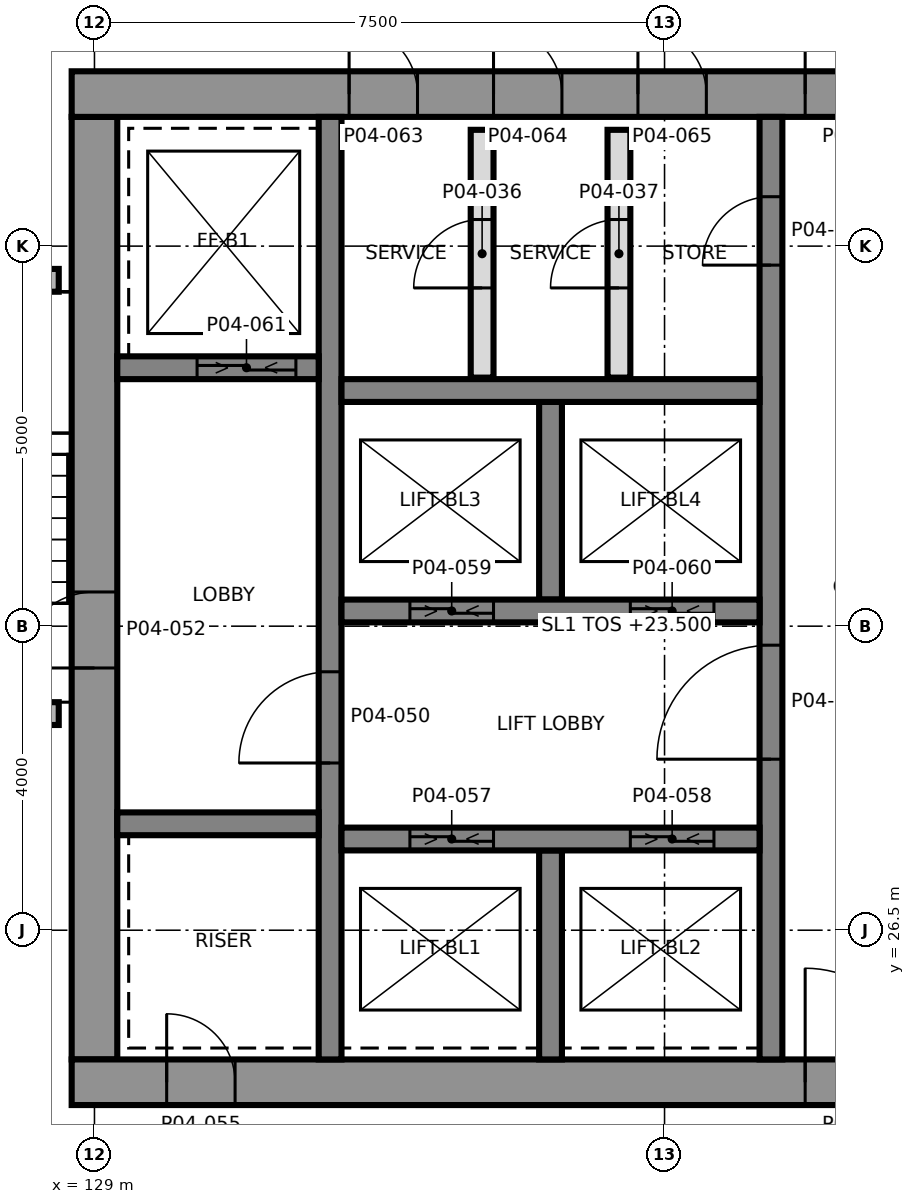
"""IFC4 building model, lengths in metres.
Left out: names, types, materials, properties, quantities, classifications, styles, units other than length and angle.
Written with IfcOpenShell. Run it as: python <this file> out.ifc"""

import sys

from ifc_helpers import new_model, si_unit, direction, frame, frame_2d, origin, place, context, subcontext, project, spatial, rectangle, extrude, element, fill, save


model = new_model("IFC4")
c1 = context("Model", 3, precision=1e-05, world=origin(), true_north=direction((0.0, 1.0)))
c2 = subcontext(c1, "Body", "Model", "MODEL_VIEW")
j1 = project(units=[si_unit("LENGTHUNIT", "METRE"), si_unit("PLANEANGLEUNIT", "RADIAN")], contexts=[c1])
p1 = place(None, origin())
s1 = spatial("IfcSite", under=j1, at=p1, CompositionType="ELEMENT")
p2 = place(p1, origin())
s2 = spatial("IfcBuilding", under=s1, at=p2, CompositionType="ELEMENT")
p3 = place(p2, frame((0.0, 0.0, 23.5)))
s3 = spatial("IfcBuildingStorey", under=s2, at=p3, CompositionType="ELEMENT", Elevation=23.5)
p4 = place(p3, frame((129.0, 24.8, 0.0), z_axis=(0.0, 0.0, 1.0), x_axis=(0.0, 1.0, 0.0)))
e1 = element("IfcWall", 1, at=p4, inside=s3, PredefinedType="SHEAR", context=c2, shape_type="SweptSolid", body=[
    extrude(rectangle(XDim=12.4, YDim=0.6, at=frame_2d((6.2, 0.0))), origin(), (0.0, 0.0, 1.0), 5.0),
])
p5 = place(p4, frame((5.15, 0.0, 0.0)))
e2 = element("IfcOpeningElement", 2, at=p5, cuts=e1, PredefinedType="OPENING", context=c2, shape_type="SweptSolid", body=[
    extrude(rectangle(XDim=1.0, YDim=2.1, at=frame_2d((0.5, 1.05))), frame((0.0, 0.31, 0.0), z_axis=(0.0, -1.0, 0.0), x_axis=(1.0, 0.0, 0.0)), (0.0, 0.0, 1.0), 0.62),
])
p6 = place(p3, frame((128.7, 24.5, 0.0), z_axis=(0.0, 0.0, 1.0), x_axis=(1.0, 0.0, 0.0)))
e3 = element("IfcWall", 3, at=p6, inside=s3, PredefinedType="SHEAR", context=c2, shape_type="SweptSolid", body=[
    extrude(rectangle(XDim=15.0, YDim=0.6, at=frame_2d((7.5, 0.0))), origin(), (0.0, 0.0, 1.0), 5.0),
])
p7 = place(p6, frame((9.65, 0.0, 0.0)))
e4 = element("IfcOpeningElement", 4, at=p7, cuts=e3, PredefinedType="OPENING", context=c2, shape_type="SweptSolid", body=[
    extrude(rectangle(XDim=1.5, YDim=2.1, at=frame_2d((0.75, 1.05))), frame((0.0, 0.31, 0.0), z_axis=(0.0, -1.0, 0.0), x_axis=(1.0, 0.0, 0.0)), (0.0, 0.0, 1.0), 0.62),
])
p8 = place(p6, frame((1.25, 0.0, 0.0)))
e5 = element("IfcOpeningElement", 5, at=p8, cuts=e3, PredefinedType="OPENING", context=c2, shape_type="SweptSolid", body=[
    extrude(rectangle(XDim=0.9, YDim=2.1, at=frame_2d((0.45, 1.05))), frame((0.0, 0.31, 0.0), z_axis=(0.0, -1.0, 0.0), x_axis=(1.0, 0.0, 0.0)), (0.0, 0.0, 1.0), 0.62),
])
p9 = place(p3, frame((128.7, 37.5, 0.0), z_axis=(0.0, 0.0, 1.0), x_axis=(1.0, 0.0, 0.0)))
e6 = element("IfcWall", 6, at=p9, inside=s3, PredefinedType="SHEAR", context=c2, shape_type="SweptSolid", body=[
    extrude(rectangle(XDim=15.0, YDim=0.6, at=frame_2d((7.5, 0.0))), origin(), (0.0, 0.0, 1.0), 5.0),
])
p10 = place(p9, frame((9.65, 0.0, 0.0)))
e7 = element("IfcOpeningElement", 7, at=p10, cuts=e6, PredefinedType="OPENING", context=c2, shape_type="SweptSolid", body=[
    extrude(rectangle(XDim=1.5, YDim=2.1, at=frame_2d((0.75, 1.05))), frame((0.0, 0.31, 0.0), z_axis=(0.0, -1.0, 0.0), x_axis=(1.0, 0.0, 0.0)), (0.0, 0.0, 1.0), 0.62),
])
p11 = place(p9, frame((12.85, 0.0, 0.0)))
e8 = element("IfcOpeningElement", 8, at=p11, cuts=e6, PredefinedType="OPENING", context=c2, shape_type="SweptSolid", body=[
    extrude(rectangle(XDim=0.9, YDim=2.1, at=frame_2d((0.45, 1.05))), frame((0.0, 0.31, 0.0), z_axis=(0.0, -1.0, 0.0), x_axis=(1.0, 0.0, 0.0)), (0.0, 0.0, 1.0), 0.62),
])
p12 = place(p9, frame((3.65, 0.0, 0.0)))
e9 = element("IfcOpeningElement", 9, at=p12, cuts=e6, PredefinedType="OPENING", context=c2, shape_type="SweptSolid", body=[
    extrude(rectangle(XDim=0.9, YDim=2.1, at=frame_2d((0.45, 1.05))), frame((0.0, 0.31, 0.0), z_axis=(0.0, -1.0, 0.0), x_axis=(1.0, 0.0, 0.0)), (0.0, 0.0, 1.0), 0.62),
])
p13 = place(p9, frame((5.55, 0.0, 0.0)))
e10 = element("IfcOpeningElement", 10, at=p13, cuts=e6, PredefinedType="OPENING", context=c2, shape_type="SweptSolid", body=[
    extrude(rectangle(XDim=0.9, YDim=2.1, at=frame_2d((0.45, 1.05))), frame((0.0, 0.31, 0.0), z_axis=(0.0, -1.0, 0.0), x_axis=(1.0, 0.0, 0.0)), (0.0, 0.0, 1.0), 0.62),
])
p14 = place(p9, frame((7.45, 0.0, 0.0)))
e11 = element("IfcOpeningElement", 11, at=p14, cuts=e6, PredefinedType="OPENING", context=c2, shape_type="SweptSolid", body=[
    extrude(rectangle(XDim=0.9, YDim=2.1, at=frame_2d((0.45, 1.05))), frame((0.0, 0.31, 0.0), z_axis=(0.0, -1.0, 0.0), x_axis=(1.0, 0.0, 0.0)), (0.0, 0.0, 1.0), 0.62),
])
p15 = place(p3, frame((132.1, 24.8, 0.0), z_axis=(0.0, 0.0, 1.0), x_axis=(0.0, 1.0, 0.0)))
e12 = element("IfcWall", 12, at=p15, inside=s3, PredefinedType="SHEAR", context=c2, shape_type="SweptSolid", body=[
    extrude(rectangle(XDim=12.4, YDim=0.3, at=frame_2d((6.2, 0.0))), origin(), (0.0, 0.0, 1.0), 5.0),
])
p16 = place(p15, frame((3.9, 0.0, 0.0)))
e13 = element("IfcOpeningElement", 13, at=p16, cuts=e12, PredefinedType="OPENING", context=c2, shape_type="SweptSolid", body=[
    extrude(rectangle(XDim=1.2, YDim=2.1, at=frame_2d((0.6, 1.05))), frame((0.0, 0.16, 0.0), z_axis=(0.0, -1.0, 0.0), x_axis=(1.0, 0.0, 0.0)), (0.0, 0.0, 1.0), 0.32),
])
p17 = place(p3, frame((137.9, 24.8, 0.0), z_axis=(0.0, 0.0, 1.0), x_axis=(0.0, 1.0, 0.0)))
e14 = element("IfcWall", 14, at=p17, inside=s3, PredefinedType="SHEAR", context=c2, shape_type="SweptSolid", body=[
    extrude(rectangle(XDim=12.4, YDim=0.3, at=frame_2d((6.2, 0.0))), origin(), (0.0, 0.0, 1.0), 5.0),
])
p18 = place(p17, frame((3.95, 0.0, 0.0)))
e15 = element("IfcOpeningElement", 15, at=p18, cuts=e14, PredefinedType="OPENING", context=c2, shape_type="SweptSolid", body=[
    extrude(rectangle(XDim=1.5, YDim=2.1, at=frame_2d((0.75, 1.05))), frame((0.0, 0.16, 0.0), z_axis=(0.0, -1.0, 0.0), x_axis=(1.0, 0.0, 0.0)), (0.0, 0.0, 1.0), 0.32),
])
p19 = place(p17, frame((10.45, 0.0, 0.0)))
e16 = element("IfcOpeningElement", 16, at=p19, cuts=e14, PredefinedType="OPENING", context=c2, shape_type="SweptSolid", body=[
    extrude(rectangle(XDim=0.9, YDim=2.1, at=frame_2d((0.45, 1.05))), frame((0.0, 0.16, 0.0), z_axis=(0.0, -1.0, 0.0), x_axis=(1.0, 0.0, 0.0)), (0.0, 0.0, 1.0), 0.32),
])
p20 = place(p3, frame((135.0, 24.8, 0.0), z_axis=(0.0, 0.0, 1.0), x_axis=(0.0, 1.0, 0.0)))
e17 = element("IfcWall", 17, at=p20, inside=s3, PredefinedType="SHEAR", context=c2, shape_type="SweptSolid", body=[
    extrude(rectangle(XDim=2.75, YDim=0.3, at=frame_2d((1.375, 0.0))), origin(), (0.0, 0.0, 1.0), 5.0),
])
p21 = place(p3, frame((135.0, 30.85, 0.0), z_axis=(0.0, 0.0, 1.0), x_axis=(0.0, 1.0, 0.0)))
e18 = element("IfcWall", 18, at=p21, inside=s3, PredefinedType="SHEAR", context=c2, shape_type="SweptSolid", body=[
    extrude(rectangle(XDim=2.6, YDim=0.3, at=frame_2d((1.3, 0.0))), origin(), (0.0, 0.0, 1.0), 5.0),
])
p22 = place(p3, frame((132.25, 27.7, 0.0), z_axis=(0.0, 0.0, 1.0), x_axis=(1.0, 0.0, 0.0)))
e19 = element("IfcWall", 19, at=p22, inside=s3, PredefinedType="SHEAR", context=c2, shape_type="SweptSolid", body=[
    extrude(rectangle(XDim=5.5, YDim=0.3, at=frame_2d((2.75, 0.0))), origin(), (0.0, 0.0, 1.0), 5.0),
])
p23 = place(p22, frame((0.9, 0.0, 0.0)))
e20 = element("IfcOpeningElement", 20, at=p23, cuts=e19, PredefinedType="OPENING", context=c2, shape_type="SweptSolid", body=[
    extrude(rectangle(XDim=1.1, YDim=2.4, at=frame_2d((0.55, 1.2))), frame((0.0, 0.16, 0.0), z_axis=(0.0, -1.0, 0.0), x_axis=(1.0, 0.0, 0.0)), (0.0, 0.0, 1.0), 0.32),
])
p24 = place(p22, frame((3.8, 0.0, 0.0)))
e21 = element("IfcOpeningElement", 21, at=p24, cuts=e19, PredefinedType="OPENING", context=c2, shape_type="SweptSolid", body=[
    extrude(rectangle(XDim=1.1, YDim=2.4, at=frame_2d((0.55, 1.2))), frame((0.0, 0.16, 0.0), z_axis=(0.0, -1.0, 0.0), x_axis=(1.0, 0.0, 0.0)), (0.0, 0.0, 1.0), 0.32),
])
p25 = place(p3, frame((132.25, 30.7, 0.0), z_axis=(0.0, 0.0, 1.0), x_axis=(1.0, 0.0, 0.0)))
e22 = element("IfcWall", 22, at=p25, inside=s3, PredefinedType="SHEAR", context=c2, shape_type="SweptSolid", body=[
    extrude(rectangle(XDim=5.5, YDim=0.3, at=frame_2d((2.75, 0.0))), origin(), (0.0, 0.0, 1.0), 5.0),
])
p26 = place(p25, frame((0.9, 0.0, 0.0)))
e23 = element("IfcOpeningElement", 23, at=p26, cuts=e22, PredefinedType="OPENING", context=c2, shape_type="SweptSolid", body=[
    extrude(rectangle(XDim=1.1, YDim=2.4, at=frame_2d((0.55, 1.2))), frame((0.0, 0.16, 0.0), z_axis=(0.0, -1.0, 0.0), x_axis=(1.0, 0.0, 0.0)), (0.0, 0.0, 1.0), 0.32),
])
p27 = place(p25, frame((3.8, 0.0, 0.0)))
e24 = element("IfcOpeningElement", 24, at=p27, cuts=e22, PredefinedType="OPENING", context=c2, shape_type="SweptSolid", body=[
    extrude(rectangle(XDim=1.1, YDim=2.4, at=frame_2d((0.55, 1.2))), frame((0.0, 0.16, 0.0), z_axis=(0.0, -1.0, 0.0), x_axis=(1.0, 0.0, 0.0)), (0.0, 0.0, 1.0), 0.32),
])
p28 = place(p3, frame((132.25, 33.6, 0.0), z_axis=(0.0, 0.0, 1.0), x_axis=(1.0, 0.0, 0.0)))
e25 = element("IfcWall", 25, at=p28, inside=s3, PredefinedType="SHEAR", context=c2, shape_type="SweptSolid", body=[
    extrude(rectangle(XDim=5.5, YDim=0.3, at=frame_2d((2.75, 0.0))), origin(), (0.0, 0.0, 1.0), 5.0),
])
p29 = place(p3, frame((129.3, 27.9, 0.0), z_axis=(0.0, 0.0, 1.0), x_axis=(1.0, 0.0, 0.0)))
e26 = element("IfcWall", 26, at=p29, inside=s3, PredefinedType="SHEAR", context=c2, shape_type="SweptSolid", body=[
    extrude(rectangle(XDim=2.65, YDim=0.3, at=frame_2d((1.325, 0.0))), origin(), (0.0, 0.0, 1.0), 5.0),
])
p30 = place(p3, frame((129.3, 33.9, 0.0), z_axis=(0.0, 0.0, 1.0), x_axis=(1.0, 0.0, 0.0)))
e27 = element("IfcWall", 27, at=p30, inside=s3, PredefinedType="SHEAR", context=c2, shape_type="SweptSolid", body=[
    extrude(rectangle(XDim=2.65, YDim=0.3, at=frame_2d((1.325, 0.0))), origin(), (0.0, 0.0, 1.0), 5.0),
])
p31 = place(p30, frame((1.05, 0.0, 0.0)))
e28 = element("IfcOpeningElement", 28, at=p31, cuts=e27, PredefinedType="OPENING", context=c2, shape_type="SweptSolid", body=[
    extrude(rectangle(XDim=1.3, YDim=2.4, at=frame_2d((0.65, 1.2))), frame((0.0, 0.16, 0.0), z_axis=(0.0, -1.0, 0.0), x_axis=(1.0, 0.0, 0.0)), (0.0, 0.0, 1.0), 0.32),
])
p32 = place(p3, frame((125.7, 29.35, 0.0), z_axis=(0.0, 0.0, 1.0), x_axis=(1.0, 0.0, 0.0)))
e29 = element("IfcWall", 29, at=p32, inside=s3, PredefinedType="SHEAR", context=c2, shape_type="SweptSolid", body=[
    extrude(rectangle(XDim=2.83, YDim=0.3, at=frame_2d((1.415, 0.0))), origin(), (0.0, 0.0, 1.0), 4.7),
])
p33 = place(p32, frame((0.975, 0.0, 0.0)))
e30 = element("IfcOpeningElement", 30, at=p33, cuts=e29, PredefinedType="OPENING", context=c2, shape_type="SweptSolid", body=[
    extrude(rectangle(XDim=1.2, YDim=2.1, at=frame_2d((0.6, 1.05))), frame((0.0, 0.16, 0.0), z_axis=(0.0, -1.0, 0.0), x_axis=(1.0, 0.0, 0.0)), (0.0, 0.0, 1.0), 0.32),
])
p34 = place(p3, frame((114.6, 35.05, 0.0), z_axis=(0.0, 0.0, 1.0), x_axis=(1.0, 0.0, 0.0)))
e31 = element("IfcWall", 31, at=p34, inside=s3, PredefinedType="SHEAR", context=c2, shape_type="SweptSolid", body=[
    extrude(rectangle(XDim=13.93, YDim=0.3, at=frame_2d((6.965, 0.0))), origin(), (0.0, 0.0, 1.0), 4.7),
])
p35 = place(p34, frame((4.83, 0.0, 0.0)))
e32 = element("IfcOpeningElement", 32, at=p35, cuts=e31, PredefinedType="OPENING", context=c2, shape_type="SweptSolid", body=[
    extrude(rectangle(XDim=1.6, YDim=2.1, at=frame_2d((0.8, 1.05))), frame((0.0, 0.16, 0.0), z_axis=(0.0, -1.0, 0.0), x_axis=(1.0, 0.0, 0.0)), (0.0, 0.0, 1.0), 0.32),
])
p36 = place(p3, frame((134.1, 33.77, 0.0), z_axis=(0.0, 0.0, 1.0), x_axis=(0.0, 1.0, 0.0)))
e33 = element("IfcWall", 33, at=p36, inside=s3, PredefinedType="PARTITIONING", context=c2, shape_type="SweptSolid", body=[
    extrude(rectangle(XDim=3.26, YDim=0.3, at=frame_2d((1.63, 0.0))), origin(), (0.0, 0.0, 1.0), 4.7),
])
p37 = place(p36, frame((1.18, 0.0, 0.0)))
e34 = element("IfcOpeningElement", 34, at=p37, cuts=e33, PredefinedType="OPENING", context=c2, shape_type="SweptSolid", body=[
    extrude(rectangle(XDim=0.9, YDim=2.1, at=frame_2d((0.45, 1.05))), frame((0.0, 0.16, 0.0), z_axis=(0.0, -1.0, 0.0), x_axis=(1.0, 0.0, 0.0)), (0.0, 0.0, 1.0), 0.32),
])
p38 = place(p3, frame((135.9, 33.77, 0.0), z_axis=(0.0, 0.0, 1.0), x_axis=(0.0, 1.0, 0.0)))
e35 = element("IfcWall", 35, at=p38, inside=s3, PredefinedType="PARTITIONING", context=c2, shape_type="SweptSolid", body=[
    extrude(rectangle(XDim=3.26, YDim=0.3, at=frame_2d((1.63, 0.0))), origin(), (0.0, 0.0, 1.0), 4.7),
])
p39 = place(p38, frame((1.18, 0.0, 0.0)))
e36 = element("IfcOpeningElement", 36, at=p39, cuts=e35, PredefinedType="OPENING", context=c2, shape_type="SweptSolid", body=[
    extrude(rectangle(XDim=0.9, YDim=2.1, at=frame_2d((0.45, 1.05))), frame((0.0, 0.16, 0.0), z_axis=(0.0, -1.0, 0.0), x_axis=(1.0, 0.0, 0.0)), (0.0, 0.0, 1.0), 0.32),
])
p40 = place(p37, origin())
e37 = element("IfcDoor", 37, at=p40, inside=s3, OperationType="SINGLE_SWING_RIGHT", PredefinedType="DOOR", context=c2, shape_type="SweptSolid", body=[
    extrude(rectangle(XDim=0.9, YDim=2.1, at=frame_2d((0.45, 1.05))), frame((0.0, 0.025, 0.0), z_axis=(0.0, -1.0, 0.0), x_axis=(1.0, 0.0, 0.0)), (0.0, 0.0, 1.0), 0.05),
])
fill(e34, e37)
p41 = place(p39, origin())
e38 = element("IfcDoor", 38, at=p41, inside=s3, OperationType="SINGLE_SWING_LEFT", PredefinedType="DOOR", context=c2, shape_type="SweptSolid", body=[
    extrude(rectangle(XDim=0.9, YDim=2.1, at=frame_2d((0.45, 1.05))), frame((0.0, 0.025, 0.0), z_axis=(0.0, -1.0, 0.0), x_axis=(1.0, 0.0, 0.0)), (0.0, 0.0, 1.0), 0.05),
])
fill(e36, e38)
p42 = place(p18, origin())
e39 = element("IfcDoor", 39, at=p42, inside=s3, OperationType="SINGLE_SWING_RIGHT", PredefinedType="DOOR", context=c2, shape_type="SweptSolid", body=[
    extrude(rectangle(XDim=1.5, YDim=2.1, at=frame_2d((0.75, 1.05))), frame((0.0, 0.025, 0.0), z_axis=(0.0, -1.0, 0.0), x_axis=(1.0, 0.0, 0.0)), (0.0, 0.0, 1.0), 0.05),
])
fill(e15, e39)
p43 = place(p16, origin())
e40 = element("IfcDoor", 40, at=p43, inside=s3, OperationType="SINGLE_SWING_LEFT", PredefinedType="DOOR", context=c2, shape_type="SweptSolid", body=[
    extrude(rectangle(XDim=1.2, YDim=2.1, at=frame_2d((0.6, 1.05))), frame((0.0, 0.025, 0.0), z_axis=(0.0, -1.0, 0.0), x_axis=(1.0, 0.0, 0.0)), (0.0, 0.0, 1.0), 0.05),
])
fill(e13, e40)
p44 = place(p5, origin())
e41 = element("IfcDoor", 41, at=p44, inside=s3, OperationType="SINGLE_SWING_RIGHT", PredefinedType="DOOR", context=c2, shape_type="SweptSolid", body=[
    extrude(rectangle(XDim=1.0, YDim=2.1, at=frame_2d((0.5, 1.05))), frame((0.0, 0.025, 0.0), z_axis=(0.0, -1.0, 0.0), x_axis=(1.0, 0.0, 0.0)), (0.0, 0.0, 1.0), 0.05),
])
fill(e2, e41)
p45 = place(p7, origin())
e42 = element("IfcDoor", 42, at=p45, inside=s3, OperationType="SINGLE_SWING_LEFT", PredefinedType="DOOR", context=c2, shape_type="SweptSolid", body=[
    extrude(rectangle(XDim=1.5, YDim=2.1, at=frame_2d((0.75, 1.05))), frame((0.0, 0.025, 0.0), z_axis=(0.0, -1.0, 0.0), x_axis=(1.0, 0.0, 0.0)), (0.0, 0.0, 1.0), 0.05),
])
fill(e4, e42)
p46 = place(p10, origin())
e43 = element("IfcDoor", 43, at=p46, inside=s3, OperationType="SINGLE_SWING_RIGHT", PredefinedType="DOOR", context=c2, shape_type="SweptSolid", body=[
    extrude(rectangle(XDim=1.5, YDim=2.1, at=frame_2d((0.75, 1.05))), frame((0.0, 0.025, 0.0), z_axis=(0.0, -1.0, 0.0), x_axis=(1.0, 0.0, 0.0)), (0.0, 0.0, 1.0), 0.05),
])
fill(e7, e43)
p47 = place(p8, origin())
e44 = element("IfcDoor", 44, at=p47, inside=s3, OperationType="SINGLE_SWING_LEFT", PredefinedType="DOOR", context=c2, shape_type="SweptSolid", body=[
    extrude(rectangle(XDim=0.9, YDim=2.1, at=frame_2d((0.45, 1.05))), frame((0.0, 0.025, 0.0), z_axis=(0.0, -1.0, 0.0), x_axis=(1.0, 0.0, 0.0)), (0.0, 0.0, 1.0), 0.05),
])
fill(e5, e44)
p48 = place(p23, origin())
e45 = element("IfcDoor", 45, at=p48, inside=s3, OperationType="SLIDING_TO_LEFT", PredefinedType="DOOR", context=c2, shape_type="SweptSolid", body=[
    extrude(rectangle(XDim=1.1, YDim=2.4, at=frame_2d((0.55, 1.2))), frame((0.0, 0.025, 0.0), z_axis=(0.0, -1.0, 0.0), x_axis=(1.0, 0.0, 0.0)), (0.0, 0.0, 1.0), 0.05),
])
fill(e20, e45)
p49 = place(p24, origin())
e46 = element("IfcDoor", 46, at=p49, inside=s3, OperationType="SLIDING_TO_LEFT", PredefinedType="DOOR", context=c2, shape_type="SweptSolid", body=[
    extrude(rectangle(XDim=1.1, YDim=2.4, at=frame_2d((0.55, 1.2))), frame((0.0, 0.025, 0.0), z_axis=(0.0, -1.0, 0.0), x_axis=(1.0, 0.0, 0.0)), (0.0, 0.0, 1.0), 0.05),
])
fill(e21, e46)
p50 = place(p26, origin())
e47 = element("IfcDoor", 47, at=p50, inside=s3, OperationType="SLIDING_TO_LEFT", PredefinedType="DOOR", context=c2, shape_type="SweptSolid", body=[
    extrude(rectangle(XDim=1.1, YDim=2.4, at=frame_2d((0.55, 1.2))), frame((0.0, 0.025, 0.0), z_axis=(0.0, -1.0, 0.0), x_axis=(1.0, 0.0, 0.0)), (0.0, 0.0, 1.0), 0.05),
])
fill(e23, e47)
p51 = place(p27, origin())
e48 = element("IfcDoor", 48, at=p51, inside=s3, OperationType="SLIDING_TO_LEFT", PredefinedType="DOOR", context=c2, shape_type="SweptSolid", body=[
    extrude(rectangle(XDim=1.1, YDim=2.4, at=frame_2d((0.55, 1.2))), frame((0.0, 0.025, 0.0), z_axis=(0.0, -1.0, 0.0), x_axis=(1.0, 0.0, 0.0)), (0.0, 0.0, 1.0), 0.05),
])
fill(e24, e48)
p52 = place(p31, origin())
e49 = element("IfcDoor", 49, at=p52, inside=s3, OperationType="SLIDING_TO_LEFT", PredefinedType="DOOR", context=c2, shape_type="SweptSolid", body=[
    extrude(rectangle(XDim=1.3, YDim=2.4, at=frame_2d((0.65, 1.2))), frame((0.0, 0.025, 0.0), z_axis=(0.0, -1.0, 0.0), x_axis=(1.0, 0.0, 0.0)), (0.0, 0.0, 1.0), 0.05),
])
fill(e28, e49)
p53 = place(p12, origin())
e50 = element("IfcDoor", 50, at=p53, inside=s3, OperationType="SINGLE_SWING_LEFT", PredefinedType="DOOR", context=c2, shape_type="SweptSolid", body=[
    extrude(rectangle(XDim=0.9, YDim=2.1, at=frame_2d((0.45, 1.05))), frame((0.0, 0.025, 0.0), z_axis=(0.0, -1.0, 0.0), x_axis=(1.0, 0.0, 0.0)), (0.0, 0.0, 1.0), 0.05),
])
fill(e9, e50)
p54 = place(p13, origin())
e51 = element("IfcDoor", 51, at=p54, inside=s3, OperationType="SINGLE_SWING_RIGHT", PredefinedType="DOOR", context=c2, shape_type="SweptSolid", body=[
    extrude(rectangle(XDim=0.9, YDim=2.1, at=frame_2d((0.45, 1.05))), frame((0.0, 0.025, 0.0), z_axis=(0.0, -1.0, 0.0), x_axis=(1.0, 0.0, 0.0)), (0.0, 0.0, 1.0), 0.05),
])
fill(e10, e51)
p55 = place(p14, origin())
e52 = element("IfcDoor", 52, at=p55, inside=s3, OperationType="SINGLE_SWING_LEFT", PredefinedType="DOOR", context=c2, shape_type="SweptSolid", body=[
    extrude(rectangle(XDim=0.9, YDim=2.1, at=frame_2d((0.45, 1.05))), frame((0.0, 0.025, 0.0), z_axis=(0.0, -1.0, 0.0), x_axis=(1.0, 0.0, 0.0)), (0.0, 0.0, 1.0), 0.05),
])
fill(e11, e52)
p56 = place(p19, origin())
e53 = element("IfcDoor", 53, at=p56, inside=s3, OperationType="SINGLE_SWING_RIGHT", PredefinedType="DOOR", context=c2, shape_type="SweptSolid", body=[
    extrude(rectangle(XDim=0.9, YDim=2.1, at=frame_2d((0.45, 1.05))), frame((0.0, 0.025, 0.0), z_axis=(0.0, -1.0, 0.0), x_axis=(1.0, 0.0, 0.0)), (0.0, 0.0, 1.0), 0.05),
])
fill(e16, e53)
save(model, sys.argv[1])
